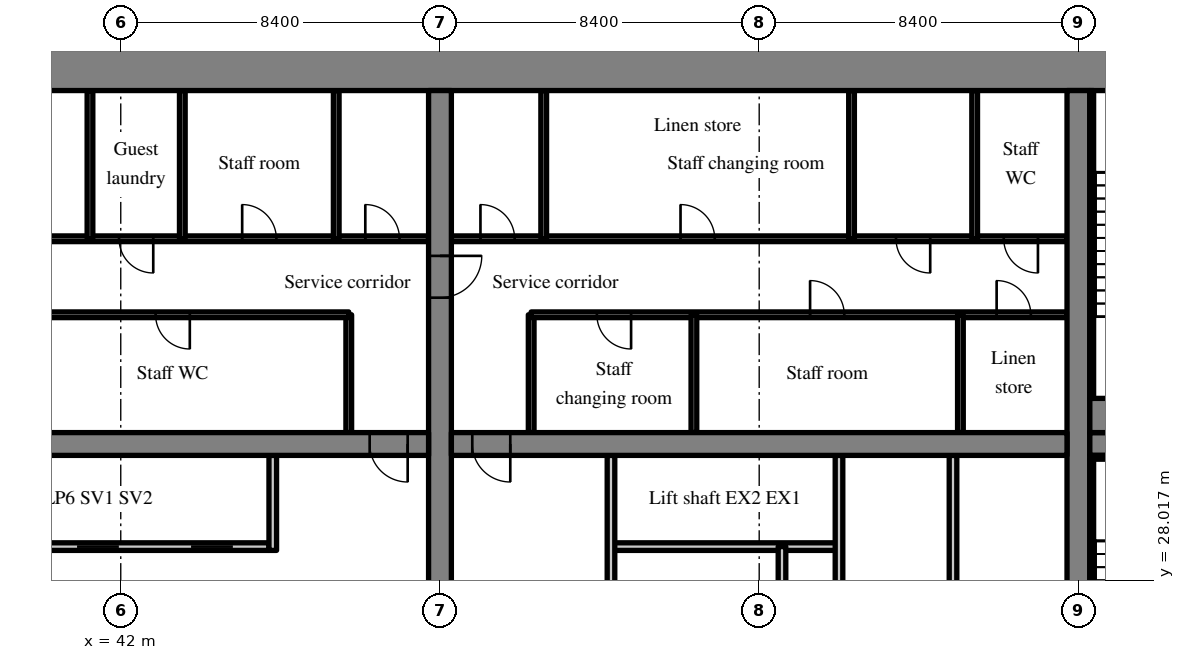
"""IFC4 building model, lengths in metres.
Left out: names, types, materials, properties, quantities, classifications, styles, units other than length and angle.
Written with IfcOpenShell. Run it as: python <this file> out.ifc"""

import sys

from ifc_helpers import new_model, si_unit, direction, frame, frame_2d, origin, place, context, subcontext, project, spatial, rectangle, extrude, source, transform, mapped, element, fill, save


model = new_model("IFC4")
c1 = context("Model", 3, precision=1e-05, world=origin(), true_north=direction((0.0, 1.0)))
c2 = subcontext(c1, "Body", "Model", "MODEL_VIEW")
j1 = project(units=[si_unit("LENGTHUNIT", "METRE"), si_unit("PLANEANGLEUNIT", "RADIAN")], contexts=[c1])
p1 = place(None, origin())
s1 = spatial("IfcSite", under=j1, at=p1, CompositionType="ELEMENT")
p2 = place(p1, origin())
s2 = spatial("IfcBuilding", under=s1, at=p2, CompositionType="ELEMENT")
p3 = place(p2, frame((0.0, 0.0, 6.0)))
s3 = spatial("IfcBuildingStorey", under=s2, at=p3, CompositionType="ELEMENT", Elevation=6.0)
m1 = source(origin(), c2, "Body", "SweptSolid", [
    extrude(rectangle(XDim=50.4, YDim=1.1, at=frame_2d((25.2, 0.0))), origin(), (0.0, 0.0, 1.0), 5.12),
])
p4 = place(p3, frame((25.2, 41.45, 0.0), z_axis=(0.0, 0.0, 1.0), x_axis=(1.0, 0.0, 0.0)))
e1 = element("IfcWall", 1, at=p4, inside=s3, PredefinedType="SHEAR", context=c2, shape_type="MappedRepresentation", body=[
    mapped(m1, transform((0.0, 0.0, 0.0), scale=1.0)),
])
m2 = source(origin(), c2, "Body", "SweptSolid", [
    extrude(rectangle(XDim=17.8, YDim=0.6, at=frame_2d((8.9, 0.0))), origin(), (0.0, 0.0, 1.0), 5.12),
])
p5 = place(p3, frame((50.4, 23.1, 0.0), z_axis=(0.0, 0.0, 1.0), x_axis=(0.0, 1.0, 0.0)))
e2 = element("IfcWall", 2, at=p5, inside=s3, PredefinedType="SHEAR", context=c2, shape_type="MappedRepresentation", body=[
    mapped(m2, transform((0.0, 0.0, 0.0), scale=1.0)),
])
m3 = source(origin(), c2, "Body", "SweptSolid", [
    extrude(rectangle(XDim=1.1, YDim=2.1, at=frame_2d((0.55, 1.05))), frame((0.0, 0.31, 0.0), z_axis=(0.0, -1.0, 0.0), x_axis=(1.0, 0.0, 0.0)), (0.0, 0.0, 1.0), 0.62),
])
p6 = place(p5, frame((12.35, 0.0, 0.0)))
e3 = element("IfcOpeningElement", 3, at=p6, cuts=e2, PredefinedType="OPENING", context=c2, shape_type="MappedRepresentation", body=[
    mapped(m3, transform((0.0, 0.0, 0.0), scale=1.0)),
])
p7 = place(p3, frame((67.2, 23.1, 0.0), z_axis=(0.0, 0.0, 1.0), x_axis=(0.0, 1.0, 0.0)))
e4 = element("IfcWall", 4, at=p7, inside=s3, PredefinedType="SHEAR", context=c2, shape_type="MappedRepresentation", body=[
    mapped(m2, transform((0.0, 0.0, 0.0), scale=1.0)),
])
m4 = source(origin(), c2, "Body", "SweptSolid", [
    extrude(rectangle(XDim=16.2, YDim=0.6, at=frame_2d((8.1, 0.0))), origin(), (0.0, 0.0, 1.0), 5.12),
])
p8 = place(p3, frame((33.9, 31.6, 0.0), z_axis=(0.0, 0.0, 1.0), x_axis=(1.0, 0.0, 0.0)))
e5 = element("IfcWall", 5, at=p8, inside=s3, PredefinedType="SHEAR", context=c2, shape_type="MappedRepresentation", body=[
    mapped(m4, transform((0.0, 0.0, 0.0), scale=1.0)),
])
m5 = source(origin(), c2, "Body", "SweptSolid", [
    extrude(rectangle(XDim=1.0, YDim=2.1, at=frame_2d((0.5, 1.05))), frame((0.0, 0.31, 0.0), z_axis=(0.0, -1.0, 0.0), x_axis=(1.0, 0.0, 0.0)), (0.0, 0.0, 1.0), 0.62),
])
p9 = place(p8, frame((14.65, 0.0, 0.0)))
e6 = element("IfcOpeningElement", 6, at=p9, cuts=e5, PredefinedType="OPENING", context=c2, shape_type="MappedRepresentation", body=[
    mapped(m5, transform((0.0, 0.0, 0.0), scale=1.0)),
])
m6 = source(origin(), c2, "Body", "SweptSolid", [
    extrude(rectangle(XDim=16.2, YDim=0.6, at=frame_2d((8.1, 0.0))), origin(), (0.0, 0.0, 1.0), 5.12),
])
p10 = place(p3, frame((50.7, 31.6, 0.0), z_axis=(0.0, 0.0, 1.0), x_axis=(1.0, 0.0, 0.0)))
e7 = element("IfcWall", 7, at=p10, inside=s3, PredefinedType="SHEAR", context=c2, shape_type="MappedRepresentation", body=[
    mapped(m6, transform((0.0, 0.0, 0.0), scale=1.0)),
])
p11 = place(p10, frame((0.55, 0.0, 0.0)))
e8 = element("IfcOpeningElement", 8, at=p11, cuts=e7, PredefinedType="OPENING", context=c2, shape_type="MappedRepresentation", body=[
    mapped(m5, transform((0.0, 0.0, 0.0), scale=1.0)),
])
m7 = source(origin(), c2, "Body", "SweptSolid", [
    extrude(rectangle(XDim=7.0, YDim=0.6, at=frame_2d((3.5, 0.0))), origin(), (0.0, 0.0, 1.0), 5.12),
])
p12 = place(p3, frame((67.5, 31.6, 0.0), z_axis=(0.0, 0.0, 1.0), x_axis=(1.0, 0.0, 0.0)))
e9 = element("IfcWall", 9, at=p12, inside=s3, PredefinedType="SHEAR", context=c2, shape_type="MappedRepresentation", body=[
    mapped(m7, transform((0.0, 0.0, 0.0), scale=1.0)),
])
p13 = place(p12, frame((5.425, 0.0, 0.0)))
e10 = element("IfcOpeningElement", 10, at=p13, cuts=e9, PredefinedType="OPENING", context=c2, shape_type="MappedRepresentation", body=[
    mapped(m3, transform((0.0, 0.0, 0.0), scale=1.0)),
])
m8 = source(origin(), c2, "Body", "SweptSolid", [
    extrude(rectangle(XDim=12.0, YDim=0.2, at=frame_2d((6.0, 0.0))), origin(), (0.0, 0.0, 1.0), 5.12),
])
p14 = place(p3, frame((33.9, 28.9, 0.0), z_axis=(0.0, 0.0, 1.0), x_axis=(1.0, 0.0, 0.0)))
e11 = element("IfcWall", 11, at=p14, inside=s3, PredefinedType="SOLIDWALL", context=c2, shape_type="MappedRepresentation", body=[
    mapped(m8, transform((0.0, 0.0, 0.0), scale=1.0)),
])
m9 = source(origin(), c2, "Body", "SweptSolid", [
    extrude(rectangle(XDim=1.1, YDim=2.1, at=frame_2d((0.55, 1.05))), frame((0.0, 0.11, 0.0), z_axis=(0.0, -1.0, 0.0), x_axis=(1.0, 0.0, 0.0)), (0.0, 0.0, 1.0), 0.22),
])
p15 = place(p14, frame((0.95, 0.0, 0.0)))
e12 = element("IfcOpeningElement", 12, at=p15, cuts=e11, PredefinedType="OPENING", context=c2, shape_type="MappedRepresentation", body=[
    mapped(m9, transform((0.0, 0.0, 0.0), scale=1.0)),
])
p16 = place(p14, frame((3.95, 0.0, 0.0)))
e13 = element("IfcOpeningElement", 13, at=p16, cuts=e11, PredefinedType="OPENING", context=c2, shape_type="MappedRepresentation", body=[
    mapped(m9, transform((0.0, 0.0, 0.0), scale=1.0)),
])
p17 = place(p14, frame((6.95, 0.0, 0.0)))
e14 = element("IfcOpeningElement", 14, at=p17, cuts=e11, PredefinedType="OPENING", context=c2, shape_type="MappedRepresentation", body=[
    mapped(m9, transform((0.0, 0.0, 0.0), scale=1.0)),
])
p18 = place(p14, frame((9.95, 0.0, 0.0)))
e15 = element("IfcOpeningElement", 15, at=p18, cuts=e11, PredefinedType="OPENING", context=c2, shape_type="MappedRepresentation", body=[
    mapped(m9, transform((0.0, 0.0, 0.0), scale=1.0)),
])
m10 = source(origin(), c2, "Body", "SweptSolid", [
    extrude(rectangle(XDim=2.5, YDim=0.2, at=frame_2d((1.25, 0.0))), origin(), (0.0, 0.0, 1.0), 5.12),
])
p19 = place(p3, frame((46.0, 28.8, 0.0), z_axis=(0.0, 0.0, 1.0), x_axis=(0.0, 1.0, 0.0)))
e16 = element("IfcWall", 16, at=p19, inside=s3, PredefinedType="SOLIDWALL", context=c2, shape_type="MappedRepresentation", body=[
    mapped(m10, transform((0.0, 0.0, 0.0), scale=1.0)),
])
m11 = source(origin(), c2, "Body", "SweptSolid", [
    extrude(rectangle(XDim=3.1, YDim=0.15, at=frame_2d((1.55, 0.0))), origin(), (0.0, 0.0, 1.0), 5.12),
])
p20 = place(p3, frame((48.0, 31.9, 0.0), z_axis=(0.0, 0.0, 1.0), x_axis=(0.0, 1.0, 0.0)))
e17 = element("IfcWall", 17, at=p20, inside=s3, PredefinedType="PARTITIONING", context=c2, shape_type="MappedRepresentation", body=[
    mapped(m11, transform((0.0, 0.0, 0.0), scale=1.0)),
])
m12 = source(origin(), c2, "Body", "SweptSolid", [
    extrude(rectangle(XDim=14.1, YDim=0.15, at=frame_2d((7.05, 0.0))), origin(), (0.0, 0.0, 1.0), 5.12),
])
p21 = place(p3, frame((33.9, 35.0, 0.0), z_axis=(0.0, 0.0, 1.0), x_axis=(1.0, 0.0, 0.0)))
e18 = element("IfcWall", 18, at=p21, inside=s3, PredefinedType="PARTITIONING", context=c2, shape_type="MappedRepresentation", body=[
    mapped(m12, transform((0.0, 0.0, 0.0), scale=1.0)),
])
m13 = source(origin(), c2, "Body", "SweptSolid", [
    extrude(rectangle(XDim=0.9, YDim=2.1, at=frame_2d((0.45, 1.05))), frame((0.0, 0.085, 0.0), z_axis=(0.0, -1.0, 0.0), x_axis=(1.0, 0.0, 0.0)), (0.0, 0.0, 1.0), 0.17),
])
p22 = place(p21, frame((2.004, 0.0, 0.0)))
e19 = element("IfcOpeningElement", 19, at=p22, cuts=e18, PredefinedType="OPENING", context=c2, shape_type="MappedRepresentation", body=[
    mapped(m13, transform((0.0, 0.0, 0.0), scale=1.0)),
])
p23 = place(p21, frame((9.017, 0.0, 0.0)))
e20 = element("IfcOpeningElement", 20, at=p23, cuts=e18, PredefinedType="OPENING", context=c2, shape_type="MappedRepresentation", body=[
    mapped(m13, transform((0.0, 0.0, 0.0), scale=1.0)),
])
m14 = source(origin(), c2, "Body", "SweptSolid", [
    extrude(rectangle(XDim=16.2, YDim=0.15, at=frame_2d((8.1, 0.0))), origin(), (0.0, 0.0, 1.0), 5.12),
])
p24 = place(p3, frame((33.9, 37.0, 0.0), z_axis=(0.0, 0.0, 1.0), x_axis=(1.0, 0.0, 0.0)))
e21 = element("IfcWall", 21, at=p24, inside=s3, PredefinedType="PARTITIONING", context=c2, shape_type="MappedRepresentation", body=[
    mapped(m14, transform((0.0, 0.0, 0.0), scale=1.0)),
])
p25 = place(p24, frame((3.195, 0.0, 0.0)))
e22 = element("IfcOpeningElement", 22, at=p25, cuts=e21, PredefinedType="OPENING", context=c2, shape_type="MappedRepresentation", body=[
    mapped(m13, transform((0.0, 0.0, 0.0), scale=1.0)),
])
p26 = place(p24, frame((8.055, 0.0, 0.0)))
e23 = element("IfcOpeningElement", 23, at=p26, cuts=e21, PredefinedType="OPENING", context=c2, shape_type="MappedRepresentation", body=[
    mapped(m13, transform((0.0, 0.0, 0.0), scale=1.0)),
])
p27 = place(p24, frame((11.295, 0.0, 0.0)))
e24 = element("IfcOpeningElement", 24, at=p27, cuts=e21, PredefinedType="OPENING", context=c2, shape_type="MappedRepresentation", body=[
    mapped(m13, transform((0.0, 0.0, 0.0), scale=1.0)),
])
p28 = place(p24, frame((14.535, 0.0, 0.0)))
e25 = element("IfcOpeningElement", 25, at=p28, cuts=e21, PredefinedType="OPENING", context=c2, shape_type="MappedRepresentation", body=[
    mapped(m13, transform((0.0, 0.0, 0.0), scale=1.0)),
])
m15 = source(origin(), c2, "Body", "SweptSolid", [
    extrude(rectangle(XDim=3.9, YDim=0.15, at=frame_2d((1.95, 0.0))), origin(), (0.0, 0.0, 1.0), 5.12),
])
for number, where, z_axis, x_axis in (
    (26, (41.19, 37.0, 0.0), (0.0, 0.0, 1.0), (0.0, 1.0, 0.0)),
    (27, (43.62, 37.0, 0.0), (0.0, 0.0, 1.0), (0.0, 1.0, 0.0)),
    (28, (47.67, 37.0, 0.0), (0.0, 0.0, 1.0), (0.0, 1.0, 0.0)),
):
    element("IfcWall", number, at=place(p3, frame(where, z_axis=z_axis, x_axis=x_axis)), inside=s3, PredefinedType="PARTITIONING", context=c2, shape_type="MappedRepresentation", body=[
        mapped(m15, transform((0.0, 0.0, 0.0), scale=1.0)),
    ])
m16 = source(origin(), c2, "Body", "SweptSolid", [
    extrude(rectangle(XDim=6.0, YDim=0.2, at=frame_2d((3.0, 0.0))), origin(), (0.0, 0.0, 1.0), 5.12),
])
p29 = place(p3, frame((60.9, 28.9, 0.0), z_axis=(0.0, 0.0, 1.0), x_axis=(-1.0, 0.0, 0.0)))
e29 = element("IfcWall", 29, at=p29, inside=s3, PredefinedType="SOLIDWALL", context=c2, shape_type="MappedRepresentation", body=[
    mapped(m16, transform((0.0, 0.0, 0.0), scale=1.0)),
])
m17 = source(origin(), c2, "Body", "SweptSolid", [
    extrude(rectangle(XDim=8.2, YDim=0.2, at=frame_2d((4.1, 0.0))), origin(), (0.0, 0.0, 1.0), 5.12),
])
for number, where, z_axis, x_axis in (
    (30, (54.9, 23.1, 0.0), (0.0, 0.0, 1.0), (0.0, 1.0, 0.0)),
    (31, (60.9, 23.1, 0.0), (0.0, 0.0, 1.0), (0.0, 1.0, 0.0)),
):
    element("IfcWall", number, at=place(p3, frame(where, z_axis=z_axis, x_axis=x_axis)), inside=s3, PredefinedType="PARTITIONING", context=c2, shape_type="MappedRepresentation", body=[
        mapped(m17, transform((0.0, 0.0, 0.0), scale=1.0)),
    ])
m18 = source(origin(), c2, "Body", "SweptSolid", [
    extrude(rectangle(XDim=5.8, YDim=0.2, at=frame_2d((2.9, 0.0))), origin(), (0.0, 0.0, 1.0), 5.12),
])
p30 = place(p3, frame((59.4, 23.1, 0.0), z_axis=(0.0, 0.0, 1.0), x_axis=(0.0, 1.0, 0.0)))
e32 = element("IfcWall", 32, at=p30, inside=s3, PredefinedType="PARTITIONING", context=c2, shape_type="MappedRepresentation", body=[
    mapped(m18, transform((0.0, 0.0, 0.0), scale=1.0)),
])
p31 = place(p3, frame((63.9, 23.1, 0.0), z_axis=(0.0, 0.0, 1.0), x_axis=(0.0, 1.0, 0.0)))
e33 = element("IfcWall", 33, at=p31, inside=s3, PredefinedType="PARTITIONING", context=c2, shape_type="MappedRepresentation", body=[
    mapped(m17, transform((0.0, 0.0, 0.0), scale=1.0)),
])
p32 = place(p3, frame((52.8, 31.9, 0.0), z_axis=(0.0, 0.0, 1.0), x_axis=(0.0, 1.0, 0.0)))
e34 = element("IfcWall", 34, at=p32, inside=s3, PredefinedType="PARTITIONING", context=c2, shape_type="MappedRepresentation", body=[
    mapped(m11, transform((0.0, 0.0, 0.0), scale=1.0)),
])
m19 = source(origin(), c2, "Body", "SweptSolid", [
    extrude(rectangle(XDim=14.1, YDim=0.15, at=frame_2d((7.05, 0.0))), origin(), (0.0, 0.0, 1.0), 5.12),
])
p33 = place(p3, frame((66.9, 35.0, 0.0), z_axis=(0.0, 0.0, 1.0), x_axis=(-1.0, 0.0, 0.0)))
e35 = element("IfcWall", 35, at=p33, inside=s3, PredefinedType="PARTITIONING", context=c2, shape_type="MappedRepresentation", body=[
    mapped(m19, transform((0.0, 0.0, 0.0), scale=1.0)),
])
p34 = place(p33, frame((0.952, 0.0, 0.0)))
e36 = element("IfcOpeningElement", 36, at=p34, cuts=e35, PredefinedType="OPENING", context=c2, shape_type="MappedRepresentation", body=[
    mapped(m13, transform((0.0, 0.0, 0.0), scale=1.0)),
])
p35 = place(p33, frame((5.861, 0.0, 0.0)))
e37 = element("IfcOpeningElement", 37, at=p35, cuts=e35, PredefinedType="OPENING", context=c2, shape_type="MappedRepresentation", body=[
    mapped(m13, transform((0.0, 0.0, 0.0), scale=1.0)),
])
p36 = place(p33, frame((11.471, 0.0, 0.0)))
e38 = element("IfcOpeningElement", 38, at=p36, cuts=e35, PredefinedType="OPENING", context=c2, shape_type="MappedRepresentation", body=[
    mapped(m13, transform((0.0, 0.0, 0.0), scale=1.0)),
])
m20 = source(origin(), c2, "Body", "SweptSolid", [
    extrude(rectangle(XDim=16.2, YDim=0.15, at=frame_2d((8.1, 0.0))), origin(), (0.0, 0.0, 1.0), 5.12),
])
p37 = place(p3, frame((66.9, 37.0, 0.0), z_axis=(0.0, 0.0, 1.0), x_axis=(-1.0, 0.0, 0.0)))
e39 = element("IfcWall", 39, at=p37, inside=s3, PredefinedType="PARTITIONING", context=c2, shape_type="MappedRepresentation", body=[
    mapped(m20, transform((0.0, 0.0, 0.0), scale=1.0)),
])
p38 = place(p37, frame((0.765, 0.0, 0.0)))
e40 = element("IfcOpeningElement", 40, at=p38, cuts=e39, PredefinedType="OPENING", context=c2, shape_type="MappedRepresentation", body=[
    mapped(m13, transform((0.0, 0.0, 0.0), scale=1.0)),
])
p39 = place(p37, frame((3.6, 0.0, 0.0)))
e41 = element("IfcOpeningElement", 41, at=p39, cuts=e39, PredefinedType="OPENING", context=c2, shape_type="MappedRepresentation", body=[
    mapped(m13, transform((0.0, 0.0, 0.0), scale=1.0)),
])
p40 = place(p37, frame((9.27, 0.0, 0.0)))
e42 = element("IfcOpeningElement", 42, at=p40, cuts=e39, PredefinedType="OPENING", context=c2, shape_type="MappedRepresentation", body=[
    mapped(m13, transform((0.0, 0.0, 0.0), scale=1.0)),
])
p41 = place(p37, frame((14.535, 0.0, 0.0)))
e43 = element("IfcOpeningElement", 43, at=p41, cuts=e39, PredefinedType="OPENING", context=c2, shape_type="MappedRepresentation", body=[
    mapped(m13, transform((0.0, 0.0, 0.0), scale=1.0)),
])
for number, where, z_axis, x_axis in (
    (44, (64.095, 31.9, 0.0), (0.0, 0.0, 1.0), (0.0, 1.0, 0.0)),
    (45, (57.082, 31.9, 0.0), (0.0, 0.0, 1.0), (0.0, 1.0, 0.0)),
):
    element("IfcWall", number, at=place(p3, frame(where, z_axis=z_axis, x_axis=x_axis)), inside=s3, PredefinedType="PARTITIONING", context=c2, shape_type="MappedRepresentation", body=[
        mapped(m11, transform((0.0, 0.0, 0.0), scale=1.0)),
    ])
for number, where, z_axis, x_axis in (
    (46, (64.47, 37.0, 0.0), (0.0, 0.0, 1.0), (0.0, 1.0, 0.0)),
    (47, (61.23, 37.0, 0.0), (0.0, 0.0, 1.0), (0.0, 1.0, 0.0)),
    (48, (53.13, 37.0, 0.0), (0.0, 0.0, 1.0), (0.0, 1.0, 0.0)),
):
    element("IfcWall", number, at=place(p3, frame(where, z_axis=z_axis, x_axis=x_axis)), inside=s3, PredefinedType="PARTITIONING", context=c2, shape_type="MappedRepresentation", body=[
        mapped(m15, transform((0.0, 0.0, 0.0), scale=1.0)),
    ])
m21 = source(origin(), c2, "Body", "SweptSolid", [
    extrude(rectangle(XDim=4.75, YDim=0.1, at=frame_2d((2.375, 0.0))), origin(), (0.0, 0.0, 1.0), 5.12),
])
p42 = place(p3, frame((67.5, 31.25, 0.0), z_axis=(0.0, 0.0, 1.0), x_axis=(1.0, 0.0, 0.0)))
e49 = element("IfcWall", 49, at=p42, inside=s3, PredefinedType="SOLIDWALL", context=c2, shape_type="MappedRepresentation", body=[
    mapped(m21, transform((0.0, 0.0, 0.0), scale=1.0)),
])
m22 = source(origin(), c2, "Body", "SweptSolid", [
    extrude(rectangle(XDim=8.1, YDim=0.1, at=frame_2d((4.05, 0.0))), origin(), (0.0, 0.0, 1.0), 5.12),
])
p43 = place(p3, frame((67.55, 23.1, 0.0), z_axis=(0.0, 0.0, 1.0), x_axis=(0.0, 1.0, 0.0)))
e50 = element("IfcWall", 50, at=p43, inside=s3, PredefinedType="SOLIDWALL", context=c2, shape_type="MappedRepresentation", body=[
    mapped(m22, transform((0.0, 0.0, 0.0), scale=1.0)),
])
m23 = source(origin(), c2, "Body", "SweptSolid", [
    extrude(rectangle(XDim=4.75, YDim=0.9, at=frame_2d((2.375, 0.0))), origin(), (0.0, 0.0, 1.0), 5.12),
])
p44 = place(p3, frame((67.5, 32.35, 0.0), z_axis=(0.0, 0.0, 1.0), x_axis=(1.0, 0.0, 0.0)))
e51 = element("IfcWall", 51, at=p44, inside=s3, PredefinedType="SOLIDWALL", context=c2, shape_type="MappedRepresentation", body=[
    mapped(m23, transform((0.0, 0.0, 0.0), scale=1.0)),
])
p45 = place(p3, frame((67.55, 32.8, 0.0), z_axis=(0.0, 0.0, 1.0), x_axis=(0.0, 1.0, 0.0)))
e52 = element("IfcWall", 52, at=p45, inside=s3, PredefinedType="SOLIDWALL", context=c2, shape_type="MappedRepresentation", body=[
    mapped(m22, transform((0.0, 0.0, 0.0), scale=1.0)),
])
m24 = source(origin(), c2, "Body", "SweptSolid", [
    extrude(rectangle(XDim=1.0, YDim=2.1, at=frame_2d((0.5, 1.05))), frame((0.0, 0.025, 0.0), z_axis=(0.0, -1.0, 0.0), x_axis=(1.0, 0.0, 0.0)), (0.0, 0.0, 1.0), 0.05),
])
p46 = place(p9, origin())
e53 = element("IfcDoor", 53, at=p46, inside=s3, OperationType="SINGLE_SWING_RIGHT", PredefinedType="DOOR", context=c2, shape_type="MappedRepresentation", body=[
    mapped(m24, transform((0.0, 0.0, 0.0), scale=1.0)),
])
fill(e6, e53)
m25 = source(origin(), c2, "Body", "SweptSolid", [
    extrude(rectangle(XDim=1.1, YDim=2.1, at=frame_2d((0.55, 1.05))), frame((0.0, 0.025, 0.0), z_axis=(0.0, -1.0, 0.0), x_axis=(1.0, 0.0, 0.0)), (0.0, 0.0, 1.0), 0.05),
])
p47 = place(p17, origin())
e54 = element("IfcDoor", 54, at=p47, inside=s3, OperationType="SLIDING_TO_LEFT", PredefinedType="DOOR", context=c2, shape_type="MappedRepresentation", body=[
    mapped(m25, transform((0.0, 0.0, 0.0), scale=1.0)),
])
fill(e14, e54)
p48 = place(p18, origin())
e55 = element("IfcDoor", 55, at=p48, inside=s3, OperationType="SLIDING_TO_RIGHT", PredefinedType="DOOR", context=c2, shape_type="MappedRepresentation", body=[
    mapped(m25, transform((0.0, 0.0, 0.0), scale=1.0)),
])
fill(e15, e55)
m26 = source(origin(), c2, "Body", "SweptSolid", [
    extrude(rectangle(XDim=0.9, YDim=2.1, at=frame_2d((0.45, 1.05))), frame((0.0, 0.025, 0.0), z_axis=(0.0, -1.0, 0.0), x_axis=(1.0, 0.0, 0.0)), (0.0, 0.0, 1.0), 0.05),
])
p49 = place(p23, origin())
e56 = element("IfcDoor", 56, at=p49, inside=s3, OperationType="SINGLE_SWING_RIGHT", PredefinedType="DOOR", context=c2, shape_type="MappedRepresentation", body=[
    mapped(m26, transform((0.0, 0.0, 0.0), scale=1.0)),
])
fill(e20, e56)
p50 = place(p26, origin())
e57 = element("IfcDoor", 57, at=p50, inside=s3, OperationType="SINGLE_SWING_RIGHT", PredefinedType="DOOR", context=c2, shape_type="MappedRepresentation", body=[
    mapped(m26, transform((0.0, 0.0, 0.0), scale=1.0)),
])
fill(e23, e57)
p51 = place(p27, origin())
e58 = element("IfcDoor", 58, at=p51, inside=s3, OperationType="SINGLE_SWING_LEFT", PredefinedType="DOOR", context=c2, shape_type="MappedRepresentation", body=[
    mapped(m26, transform((0.0, 0.0, 0.0), scale=1.0)),
])
fill(e24, e58)
p52 = place(p28, origin())
e59 = element("IfcDoor", 59, at=p52, inside=s3, OperationType="SINGLE_SWING_LEFT", PredefinedType="DOOR", context=c2, shape_type="MappedRepresentation", body=[
    mapped(m26, transform((0.0, 0.0, 0.0), scale=1.0)),
])
fill(e25, e59)
p53 = place(p11, origin())
e60 = element("IfcDoor", 60, at=p53, inside=s3, OperationType="SINGLE_SWING_RIGHT", PredefinedType="DOOR", context=c2, shape_type="MappedRepresentation", body=[
    mapped(m24, transform((0.0, 0.0, 0.0), scale=1.0)),
])
fill(e8, e60)
p54 = place(p34, origin())
e61 = element("IfcDoor", 61, at=p54, inside=s3, OperationType="SINGLE_SWING_RIGHT", PredefinedType="DOOR", context=c2, shape_type="MappedRepresentation", body=[
    mapped(m26, transform((0.0, 0.0, 0.0), scale=1.0)),
])
fill(e36, e61)
p55 = place(p35, origin())
e62 = element("IfcDoor", 62, at=p55, inside=s3, OperationType="SINGLE_SWING_RIGHT", PredefinedType="DOOR", context=c2, shape_type="MappedRepresentation", body=[
    mapped(m26, transform((0.0, 0.0, 0.0), scale=1.0)),
])
fill(e37, e62)
p56 = place(p36, origin())
e63 = element("IfcDoor", 63, at=p56, inside=s3, OperationType="SINGLE_SWING_LEFT", PredefinedType="DOOR", context=c2, shape_type="MappedRepresentation", body=[
    mapped(m26, transform((0.0, 0.0, 0.0), scale=1.0)),
])
fill(e38, e63)
p57 = place(p38, origin())
e64 = element("IfcDoor", 64, at=p57, inside=s3, OperationType="SINGLE_SWING_LEFT", PredefinedType="DOOR", context=c2, shape_type="MappedRepresentation", body=[
    mapped(m26, transform((0.0, 0.0, 0.0), scale=1.0)),
])
fill(e40, e64)
p58 = place(p39, origin())
e65 = element("IfcDoor", 65, at=p58, inside=s3, OperationType="SINGLE_SWING_LEFT", PredefinedType="DOOR", context=c2, shape_type="MappedRepresentation", body=[
    mapped(m26, transform((0.0, 0.0, 0.0), scale=1.0)),
])
fill(e41, e65)
p59 = place(p40, origin())
e66 = element("IfcDoor", 66, at=p59, inside=s3, OperationType="SINGLE_SWING_RIGHT", PredefinedType="DOOR", context=c2, shape_type="MappedRepresentation", body=[
    mapped(m26, transform((0.0, 0.0, 0.0), scale=1.0)),
])
fill(e42, e66)
p60 = place(p41, origin())
e67 = element("IfcDoor", 67, at=p60, inside=s3, OperationType="SINGLE_SWING_RIGHT", PredefinedType="DOOR", context=c2, shape_type="MappedRepresentation", body=[
    mapped(m26, transform((0.0, 0.0, 0.0), scale=1.0)),
])
fill(e43, e67)
p61 = place(p6, origin())
e68 = element("IfcDoor", 68, at=p61, inside=s3, OperationType="SINGLE_SWING_RIGHT", PredefinedType="DOOR", context=c2, shape_type="MappedRepresentation", body=[
    mapped(m25, transform((0.0, 0.0, 0.0), scale=1.0)),
])
fill(e3, e68)
save(model, sys.argv[1])
